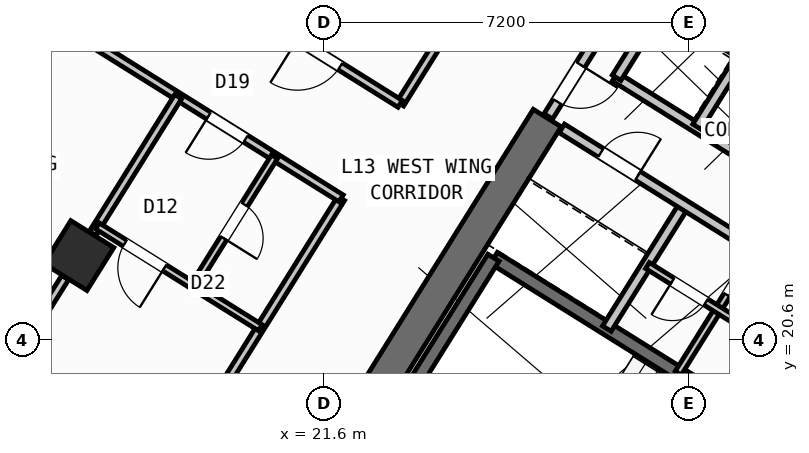
"""IFC4 building model, lengths in metres.
Left out: names, types, materials, properties, quantities, classifications, styles, units other than length and angle.
Written with IfcOpenShell. Run it as: python <this file> out.ifc"""

import sys

from ifc_helpers import new_model, si_unit, direction, frame, frame_2d, origin, origin_2d, place, context, subcontext, project, spatial, rectangle, hollow_rectangle, extrude, source, transform, mapped, element, fill, save


model = new_model("IFC4")
c1 = context("Model", 3, precision=1e-05, world=origin(), true_north=direction((0.0, 1.0)))
c2 = subcontext(c1, "Body", "Model", "MODEL_VIEW")
j1 = project(units=[si_unit("LENGTHUNIT", "METRE"), si_unit("PLANEANGLEUNIT", "RADIAN")], contexts=[c1])
p1 = place(None, origin())
s1 = spatial("IfcSite", under=j1, at=p1, CompositionType="ELEMENT")
p2 = place(p1, origin())
s2 = spatial("IfcBuilding", under=s1, at=p2, CompositionType="ELEMENT")
p3 = place(p2, frame((0.0, 0.0, 52.8)))
s3 = spatial("IfcBuildingStorey", under=s2, at=p3, CompositionType="ELEMENT", Elevation=52.8)
p4 = place(p3, frame((40.615, 23.983, 0.0), z_axis=(0.0, 0.0, 1.0), x_axis=(-0.848045953968, 0.529922692436, 0.0)))
e1 = element("IfcWall", 1, at=p4, inside=s3, PredefinedType="SHEAR", context=c2, shape_type="SweptSolid", body=[
    extrude(rectangle(XDim=13.24, YDim=0.65, at=frame_2d((6.62, 0.0))), origin(), (0.0, 0.0, 1.0), 3.35),
])
p5 = place(p3, frame((26.007, 24.976, 0.0), z_axis=(0.0, 0.0, 1.0), x_axis=(-0.529916319127, -0.848049936456, 0.0)))
e2 = element("IfcWall", 2, at=p5, inside=s3, PredefinedType="SHEAR", context=c2, shape_type="SweptSolid", body=[
    extrude(rectangle(XDim=6.375, YDim=0.65, at=frame_2d((3.188, 0.0))), origin(), (0.0, 0.0, 1.0), 3.35),
])
m1 = source(origin(), c2, "Body", "SweptSolid", [
    extrude(hollow_rectangle(XDim=1.0, YDim=1.0, WallThickness=0.04, at=origin_2d()), origin(), (0.0, 0.0, 1.0), 3.6),
])
p6 = place(p3, frame((16.764, 22.261, 0.0), z_axis=(0.0, 0.0, 1.0), x_axis=(-0.848048096156, 0.529919264233, 0.0)))
e3 = element("IfcColumn", 3, at=p6, inside=s3, PredefinedType="COLUMN", context=c2, shape_type="MappedRepresentation", body=[
    mapped(m1, transform((0.0, 0.0, 0.0), scale=1.0)),
])
p7 = place(p3, frame((29.268, 6.429, 0.0), z_axis=(0.0, 0.0, 1.0), x_axis=(-0.848049971435, 0.529916263149, 0.0)))
e4 = element("IfcWall", 4, at=p7, inside=s3, PredefinedType="STANDARD", context=c2, shape_type="SweptSolid", body=[
    extrude(rectangle(XDim=31.588, YDim=0.32, at=frame_2d((15.794, 0.0))), origin(), (0.0, 0.0, 1.0), 3.35),
])
p8 = place(p7, frame((16.362, 0.0, 0.0)))
e5 = element("IfcOpeningElement", 5, at=p8, cuts=e4, PredefinedType="OPENING", context=c2, shape_type="SweptSolid", body=[
    extrude(rectangle(XDim=1.2, YDim=2.15, at=frame_2d((0.6, 1.075))), frame((0.0, 0.17, 0.0), z_axis=(0.0, -1.0, 0.0), x_axis=(1.0, 0.0, 0.0)), (0.0, 0.0, 1.0), 0.34),
])
p9 = place(p7, frame((2.989, 0.0, 0.8)))
e6 = element("IfcOpeningElement", 6, at=p9, cuts=e4, PredefinedType="OPENING", context=c2, shape_type="SweptSolid", body=[
    extrude(rectangle(XDim=2.1, YDim=1.55, at=frame_2d((1.05, 0.775))), frame((0.0, 0.17, 0.0), z_axis=(0.0, -1.0, 0.0), x_axis=(1.0, 0.0, 0.0)), (0.0, 0.0, 1.0), 0.34),
])
p10 = place(p7, frame((8.359, 0.0, 0.8)))
e7 = element("IfcOpeningElement", 7, at=p10, cuts=e4, PredefinedType="OPENING", context=c2, shape_type="SweptSolid", body=[
    extrude(rectangle(XDim=2.1, YDim=1.55, at=frame_2d((1.05, 0.775))), frame((0.0, 0.17, 0.0), z_axis=(0.0, -1.0, 0.0), x_axis=(1.0, 0.0, 0.0)), (0.0, 0.0, 1.0), 0.34),
])
p11 = place(p7, frame((13.284, 0.0, 0.95)))
e8 = element("IfcOpeningElement", 8, at=p11, cuts=e4, PredefinedType="OPENING", context=c2, shape_type="SweptSolid", body=[
    extrude(rectangle(XDim=1.2, YDim=1.4, at=frame_2d((0.6, 0.7))), frame((0.0, 0.17, 0.0), z_axis=(0.0, -1.0, 0.0), x_axis=(1.0, 0.0, 0.0)), (0.0, 0.0, 1.0), 0.34),
])
p12 = place(p7, frame((20.259, 0.0, 0.95)))
e9 = element("IfcOpeningElement", 9, at=p12, cuts=e4, PredefinedType="OPENING", context=c2, shape_type="SweptSolid", body=[
    extrude(rectangle(XDim=1.2, YDim=1.4, at=frame_2d((0.6, 0.7))), frame((0.0, 0.17, 0.0), z_axis=(0.0, -1.0, 0.0), x_axis=(1.0, 0.0, 0.0)), (0.0, 0.0, 1.0), 0.34),
])
p13 = place(p7, frame((22.929, 0.0, 0.95)))
e10 = element("IfcOpeningElement", 10, at=p13, cuts=e4, PredefinedType="OPENING", context=c2, shape_type="SweptSolid", body=[
    extrude(rectangle(XDim=1.2, YDim=1.4, at=frame_2d((0.6, 0.7))), frame((0.0, 0.17, 0.0), z_axis=(0.0, -1.0, 0.0), x_axis=(1.0, 0.0, 0.0)), (0.0, 0.0, 1.0), 0.34),
])
p14 = place(p7, frame((26.106, 0.0, 0.85)))
e11 = element("IfcOpeningElement", 11, at=p14, cuts=e4, PredefinedType="OPENING", context=c2, shape_type="SweptSolid", body=[
    extrude(rectangle(XDim=1.5, YDim=1.5, at=frame_2d((0.75, 0.75))), frame((0.0, 0.17, 0.0), z_axis=(0.0, -1.0, 0.0), x_axis=(1.0, 0.0, 0.0)), (0.0, 0.0, 1.0), 0.34),
])
p15 = place(p7, frame((29.068, 0.0, 0.85)))
e12 = element("IfcOpeningElement", 12, at=p15, cuts=e4, PredefinedType="OPENING", context=c2, shape_type="SweptSolid", body=[
    extrude(rectangle(XDim=1.8, YDim=1.5, at=frame_2d((0.9, 0.75))), frame((0.0, 0.17, 0.0), z_axis=(0.0, -1.0, 0.0), x_axis=(1.0, 0.0, 0.0)), (0.0, 0.0, 1.0), 0.34),
])
p16 = place(p3, frame((14.138, 41.825, 0.0), z_axis=(0.0, 0.0, 1.0), x_axis=(0.848046498049, -0.529921821731, 0.0)))
e13 = element("IfcWall", 13, at=p16, inside=s3, PredefinedType="STANDARD", context=c2, shape_type="SweptSolid", body=[
    extrude(rectangle(XDim=31.588, YDim=0.32, at=frame_2d((15.794, 0.0))), origin(), (0.0, 0.0, 1.0), 3.35),
])
p17 = place(p16, frame((3.159, 0.0, 0.0)))
e14 = element("IfcOpeningElement", 14, at=p17, cuts=e13, PredefinedType="OPENING", context=c2, shape_type="SweptSolid", body=[
    extrude(rectangle(XDim=1.05, YDim=2.15, at=frame_2d((0.525, 1.075))), frame((0.0, 0.17, 0.0), z_axis=(0.0, -1.0, 0.0), x_axis=(1.0, 0.0, 0.0)), (0.0, 0.0, 1.0), 0.34),
])
p18 = place(p16, frame((0.906, 0.0, 1.0)))
e15 = element("IfcOpeningElement", 15, at=p18, cuts=e13, PredefinedType="OPENING", context=c2, shape_type="SweptSolid", body=[
    extrude(rectangle(XDim=0.9, YDim=1.25, at=frame_2d((0.45, 0.625))), frame((0.0, 0.17, 0.0), z_axis=(0.0, -1.0, 0.0), x_axis=(1.0, 0.0, 0.0)), (0.0, 0.0, 1.0), 0.34),
])
p19 = place(p16, frame((9.537, 0.0, 0.85)))
e16 = element("IfcOpeningElement", 16, at=p19, cuts=e13, PredefinedType="OPENING", context=c2, shape_type="SweptSolid", body=[
    extrude(rectangle(XDim=1.8, YDim=1.5, at=frame_2d((0.9, 0.75))), frame((0.0, 0.17, 0.0), z_axis=(0.0, -1.0, 0.0), x_axis=(1.0, 0.0, 0.0)), (0.0, 0.0, 1.0), 0.34),
])
p20 = place(p16, frame((13.899, 0.0, 0.85)))
e17 = element("IfcOpeningElement", 17, at=p20, cuts=e13, PredefinedType="OPENING", context=c2, shape_type="SweptSolid", body=[
    extrude(rectangle(XDim=1.5, YDim=1.5, at=frame_2d((0.75, 0.75))), frame((0.0, 0.17, 0.0), z_axis=(0.0, -1.0, 0.0), x_axis=(1.0, 0.0, 0.0)), (0.0, 0.0, 1.0), 0.34),
])
p21 = place(p16, frame((22.019, 0.0, 0.95)))
e18 = element("IfcOpeningElement", 18, at=p21, cuts=e13, PredefinedType="OPENING", context=c2, shape_type="SweptSolid", body=[
    extrude(rectangle(XDim=1.2, YDim=1.4, at=frame_2d((0.6, 0.7))), frame((0.0, 0.17, 0.0), z_axis=(0.0, -1.0, 0.0), x_axis=(1.0, 0.0, 0.0)), (0.0, 0.0, 1.0), 0.34),
])
p22 = place(p16, frame((27.569, 0.0, 0.95)))
e19 = element("IfcOpeningElement", 19, at=p22, cuts=e13, PredefinedType="OPENING", context=c2, shape_type="SweptSolid", body=[
    extrude(rectangle(XDim=1.2, YDim=1.4, at=frame_2d((0.6, 0.7))), frame((0.0, 0.17, 0.0), z_axis=(0.0, -1.0, 0.0), x_axis=(1.0, 0.0, 0.0)), (0.0, 0.0, 1.0), 0.34),
])
p23 = place(p3, frame((31.28, 18.261, 0.0), z_axis=(0.0, 0.0, 1.0), x_axis=(-0.848051618787, 0.529913626805, 0.0)))
e20 = element("IfcWall", 20, at=p23, inside=s3, PredefinedType="SHEAR", context=c2, shape_type="SweptSolid", body=[
    extrude(rectangle(XDim=7.46, YDim=0.26, at=frame_2d((3.73, 0.0))), origin(), (0.0, 0.0, 1.0), 3.35),
])
p24 = place(p23, frame((0.36, 0.0, 0.0)))
e21 = element("IfcOpeningElement", 21, at=p24, cuts=e20, PredefinedType="OPENING", context=c2, shape_type="SweptSolid", body=[
    extrude(rectangle(XDim=0.86, YDim=2.05, at=frame_2d((0.43, 1.025))), frame((0.0, 0.14, 0.0), z_axis=(0.0, -1.0, 0.0), x_axis=(1.0, 0.0, 0.0)), (0.0, 0.0, 1.0), 0.28),
])
p25 = place(p3, frame((24.945, 22.22, 0.0), z_axis=(0.0, 0.0, 1.0), x_axis=(-0.529908658664, -0.84805472316, 0.0)))
e22 = element("IfcWall", 22, at=p25, inside=s3, PredefinedType="SHEAR", context=c2, shape_type="SweptSolid", body=[
    extrude(rectangle(XDim=3.16, YDim=0.26, at=frame_2d((1.58, 0.0))), origin(), (0.0, 0.0, 1.0), 3.35),
])
p26 = place(p3, frame((31.822, 24.998, 0.0), z_axis=(0.0, 0.0, 1.0), x_axis=(-0.848058348634, 0.529902856485, 0.0)))
e23 = element("IfcWall", 23, at=p26, inside=s3, PredefinedType="STANDARD", context=c2, shape_type="SweptSolid", body=[
    extrude(rectangle(XDim=4.568, YDim=0.2, at=frame_2d((2.284, 0.0))), origin(), (0.0, 0.0, 1.0), 3.34),
])
p27 = place(p3, frame((32.108, 22.814, 0.0), z_axis=(0.0, 0.0, 1.0), x_axis=(-0.848042229521, 0.529928652696, 0.0)))
e24 = element("IfcWall", 24, at=p27, inside=s3, PredefinedType="STANDARD", context=c2, shape_type="SweptSolid", body=[
    extrude(rectangle(XDim=5.62, YDim=0.2, at=frame_2d((2.81, 0.0))), origin(), (0.0, 0.0, 1.0), 3.34),
])
p28 = place(p3, frame((28.25, 27.17, 0.0), z_axis=(0.0, 0.0, 1.0), x_axis=(-0.529905827651, -0.848056492117, 0.0)))
e25 = element("IfcWall", 25, at=p28, inside=s3, PredefinedType="STANDARD", context=c2, shape_type="SweptSolid", body=[
    extrude(rectangle(XDim=1.65, YDim=0.2, at=frame_2d((0.825, 0.0))), origin(), (0.0, 0.0, 1.0), 3.34),
])
p29 = place(p3, frame((29.801, 26.142, 0.0), z_axis=(0.0, 0.0, 1.0), x_axis=(-0.529998940003, -0.847998304005, 0.0)))
e26 = element("IfcWall", 26, at=p29, inside=s3, PredefinedType="STANDARD", context=c2, shape_type="SweptSolid", body=[
    extrude(rectangle(XDim=1.58, YDim=0.2, at=frame_2d((0.79, 0.0))), origin(), (0.0, 0.0, 1.0), 3.34),
])
p30 = place(p3, frame((28.71, 23.263, 0.0), z_axis=(0.0, 0.0, 1.0), x_axis=(-0.529907497854, -0.848055448493, 0.0)))
e27 = element("IfcWall", 27, at=p30, inside=s3, PredefinedType="STANDARD", context=c2, shape_type="SweptSolid", body=[
    extrude(rectangle(XDim=2.88, YDim=0.2, at=frame_2d((1.44, 0.0))), origin(), (0.0, 0.0, 1.0), 3.34),
])
p31 = place(p3, frame((31.525, 21.504, 0.0), z_axis=(0.0, 0.0, 1.0), x_axis=(-0.848044998614, 0.529924221305, 0.0)))
e28 = element("IfcWall", 28, at=p31, inside=s3, PredefinedType="STANDARD", context=c2, shape_type="SweptSolid", body=[
    extrude(rectangle(XDim=6.168, YDim=0.2, at=frame_2d((3.084, 0.0))), origin(), (0.0, 0.0, 1.0), 3.34),
])
p32 = place(p31, frame((4.4, 0.0, 0.0)))
e29 = element("IfcOpeningElement", 29, at=p32, cuts=e28, PredefinedType="OPENING", context=c2, shape_type="SweptSolid", body=[
    extrude(rectangle(XDim=0.86, YDim=2.05, at=frame_2d((0.43, 1.025))), frame((0.0, 0.11, 0.0), z_axis=(0.0, -1.0, 0.0), x_axis=(1.0, 0.0, 0.0)), (0.0, 0.0, 1.0), 0.22),
])
p33 = place(p31, frame((0.35, 0.0, 0.0)))
e30 = element("IfcOpeningElement", 30, at=p33, cuts=e28, PredefinedType="OPENING", context=c2, shape_type="SweptSolid", body=[
    extrude(rectangle(XDim=0.86, YDim=2.05, at=frame_2d((0.43, 1.025))), frame((0.0, 0.11, 0.0), z_axis=(0.0, -1.0, 0.0), x_axis=(1.0, 0.0, 0.0)), (0.0, 0.0, 1.0), 0.22),
])
p34 = place(p3, frame((30.117, 22.384, 0.0), z_axis=(0.0, 0.0, 1.0), x_axis=(-0.529951914384, -0.848027693204, 0.0)))
e31 = element("IfcWall", 31, at=p34, inside=s3, PredefinedType="PLUMBINGWALL", context=c2, shape_type="SweptSolid", body=[
    extrude(rectangle(XDim=1.4, YDim=0.14, at=frame_2d((0.7, 0.0))), origin(), (0.0, 0.0, 1.0), 3.34),
])
p35 = place(p34, frame((0.28, 0.0, 0.0)))
e32 = element("IfcOpeningElement", 32, at=p35, cuts=e31, PredefinedType="OPENING", context=c2, shape_type="SweptSolid", body=[
    extrude(rectangle(XDim=0.78, YDim=2.05, at=frame_2d((0.39, 1.025))), frame((0.0, 0.08, 0.0), z_axis=(0.0, -1.0, 0.0), x_axis=(1.0, 0.0, 0.0)), (0.0, 0.0, 1.0), 0.16),
])
p36 = place(p3, frame((29.375, 21.196, 0.0), z_axis=(0.0, 0.0, 1.0), x_axis=(-0.529865479138, -0.848081702443, 0.0)))
e33 = element("IfcWall", 33, at=p36, inside=s3, PredefinedType="PLUMBINGWALL", context=c2, shape_type="SweptSolid", body=[
    extrude(rectangle(XDim=1.48, YDim=0.14, at=frame_2d((0.74, 0.0))), origin(), (0.0, 0.0, 1.0), 3.34),
])
p37 = place(p3, frame((30.766, 20.327, 0.0), z_axis=(0.0, 0.0, 1.0), x_axis=(-0.848052663127, 0.529911955482, 0.0)))
e34 = element("IfcWall", 34, at=p37, inside=s3, PredefinedType="PLUMBINGWALL", context=c2, shape_type="SweptSolid", body=[
    extrude(rectangle(XDim=3.28, YDim=0.14, at=frame_2d((1.64, 0.0))), origin(), (0.0, 0.0, 1.0), 3.34),
])
p38 = place(p37, frame((0.25, 0.0, 0.0)))
e35 = element("IfcOpeningElement", 35, at=p38, cuts=e34, PredefinedType="OPENING", context=c2, shape_type="SweptSolid", body=[
    extrude(rectangle(XDim=0.78, YDim=2.05, at=frame_2d((0.39, 1.025))), frame((0.0, 0.08, 0.0), z_axis=(0.0, -1.0, 0.0), x_axis=(1.0, 0.0, 0.0)), (0.0, 0.0, 1.0), 0.16),
])
p39 = place(p37, frame((1.92, 0.0, 0.0)))
e36 = element("IfcOpeningElement", 36, at=p39, cuts=e34, PredefinedType="OPENING", context=c2, shape_type="SweptSolid", body=[
    extrude(rectangle(XDim=0.78, YDim=2.05, at=frame_2d((0.39, 1.025))), frame((0.0, 0.08, 0.0), z_axis=(0.0, -1.0, 0.0), x_axis=(1.0, 0.0, 0.0)), (0.0, 0.0, 1.0), 0.16),
])
p40 = place(p3, frame((27.596, 27.52, 0.0), z_axis=(0.0, 0.0, 1.0), x_axis=(-0.529865479138, -0.848081702443, 0.0)))
e37 = element("IfcWall", 37, at=p40, inside=s3, PredefinedType="STANDARD", context=c2, shape_type="SweptSolid", body=[
    extrude(rectangle(XDim=2.96, YDim=0.2, at=frame_2d((1.48, 0.0))), origin(), (0.0, 0.0, 1.0), 3.34),
])
p41 = place(p40, frame((1.76, 0.0, 0.0)))
e38 = element("IfcOpeningElement", 38, at=p41, cuts=e37, PredefinedType="OPENING", context=c2, shape_type="SweptSolid", body=[
    extrude(rectangle(XDim=0.86, YDim=2.05, at=frame_2d((0.43, 1.025))), frame((0.0, 0.11, 0.0), z_axis=(0.0, -1.0, 0.0), x_axis=(1.0, 0.0, 0.0)), (0.0, 0.0, 1.0), 0.22),
])
p42 = place(p3, frame((27.953, 33.016, 0.0), z_axis=(0.0, 0.0, 1.0), x_axis=(-0.529903001606, -0.848058257957, 0.0)))
e39 = element("IfcWall", 39, at=p42, inside=s3, PredefinedType="PARTITIONING", context=c2, shape_type="SweptSolid", body=[
    extrude(rectangle(XDim=9.15, YDim=0.16, at=frame_2d((4.575, 0.0))), origin(), (0.0, 0.0, 1.0), 3.34),
])
p43 = place(p3, frame((21.938, 23.391, 0.0), z_axis=(0.0, 0.0, 1.0), x_axis=(-0.529924725692, -0.848044683434, 0.0)))
e40 = element("IfcWall", 40, at=p43, inside=s3, PredefinedType="PARTITIONING", context=c2, shape_type="SweptSolid", body=[
    extrude(rectangle(XDim=10.35, YDim=0.16, at=frame_2d((5.175, 0.0))), origin(), (0.0, 0.0, 1.0), 3.34),
])
p44 = place(p3, frame((23.104, 25.256, 0.0), z_axis=(0.0, 0.0, 1.0), x_axis=(-0.848041752158, 0.529929416617, 0.0)))
e41 = element("IfcWall", 41, at=p44, inside=s3, PredefinedType="PARTITIONING", context=c2, shape_type="SweptSolid", body=[
    extrude(rectangle(XDim=16.73, YDim=0.16, at=frame_2d((8.365, 0.0))), origin(), (0.0, 0.0, 1.0), 3.34),
])
p45 = place(p44, frame((1.395, 0.0, 0.0)))
e42 = element("IfcOpeningElement", 42, at=p45, cuts=e41, PredefinedType="OPENING", context=c2, shape_type="SweptSolid", body=[
    extrude(rectangle(XDim=1.0, YDim=2.1, at=frame_2d((0.5, 1.05))), frame((0.0, 0.09, 0.0), z_axis=(0.0, -1.0, 0.0), x_axis=(1.0, 0.0, 0.0)), (0.0, 0.0, 1.0), 0.18),
])
p46 = place(p44, frame((7.82, 0.0, 0.0)))
e43 = element("IfcOpeningElement", 43, at=p46, cuts=e41, PredefinedType="OPENING", context=c2, shape_type="SweptSolid", body=[
    extrude(rectangle(XDim=1.0, YDim=2.1, at=frame_2d((0.5, 1.05))), frame((0.0, 0.09, 0.0), z_axis=(0.0, -1.0, 0.0), x_axis=(1.0, 0.0, 0.0)), (0.0, 0.0, 1.0), 0.18),
])
p47 = place(p44, frame((14.76, 0.0, 0.0)))
e44 = element("IfcOpeningElement", 44, at=p47, cuts=e41, PredefinedType="OPENING", context=c2, shape_type="SweptSolid", body=[
    extrude(rectangle(XDim=1.0, YDim=2.1, at=frame_2d((0.5, 1.05))), frame((0.0, 0.09, 0.0), z_axis=(0.0, -1.0, 0.0), x_axis=(1.0, 0.0, 0.0)), (0.0, 0.0, 1.0), 0.18),
])
p48 = place(p3, frame((21.938, 23.391, 0.0), z_axis=(0.0, 0.0, 1.0), x_axis=(-0.848045850158, 0.529922858565, 0.0)))
e45 = element("IfcWall", 45, at=p48, inside=s3, PredefinedType="PARTITIONING", context=c2, shape_type="SweptSolid", body=[
    extrude(rectangle(XDim=16.73, YDim=0.16, at=frame_2d((8.365, 0.0))), origin(), (0.0, 0.0, 1.0), 3.34),
])
p49 = place(p48, frame((2.22, 0.0, 0.0)))
e46 = element("IfcOpeningElement", 46, at=p49, cuts=e45, PredefinedType="OPENING", context=c2, shape_type="SweptSolid", body=[
    extrude(rectangle(XDim=0.86, YDim=2.05, at=frame_2d((0.43, 1.025))), frame((0.0, 0.09, 0.0), z_axis=(0.0, -1.0, 0.0), x_axis=(1.0, 0.0, 0.0)), (0.0, 0.0, 1.0), 0.18),
])
p50 = place(p48, frame((6.49, 0.0, 0.0)))
e47 = element("IfcOpeningElement", 47, at=p50, cuts=e45, PredefinedType="OPENING", context=c2, shape_type="SweptSolid", body=[
    extrude(rectangle(XDim=1.0, YDim=2.1, at=frame_2d((0.5, 1.05))), frame((0.0, 0.09, 0.0), z_axis=(0.0, -1.0, 0.0), x_axis=(1.0, 0.0, 0.0)), (0.0, 0.0, 1.0), 0.18),
])
p51 = place(p48, frame((11.14, 0.0, 0.0)))
e48 = element("IfcOpeningElement", 48, at=p51, cuts=e45, PredefinedType="OPENING", context=c2, shape_type="SweptSolid", body=[
    extrude(rectangle(XDim=1.0, YDim=2.1, at=frame_2d((0.5, 1.05))), frame((0.0, 0.09, 0.0), z_axis=(0.0, -1.0, 0.0), x_axis=(1.0, 0.0, 0.0)), (0.0, 0.0, 1.0), 0.18),
])
p52 = place(p3, frame((18.724, 25.399, 0.0), z_axis=(0.0, 0.0, 1.0), x_axis=(-0.529930102756, -0.848041323399, 0.0)))
e49 = element("IfcWall", 49, at=p52, inside=s3, PredefinedType="PARTITIONING", context=c2, shape_type="SweptSolid", body=[
    extrude(rectangle(XDim=3.188, YDim=0.16, at=frame_2d((1.594, 0.0))), origin(), (0.0, 0.0, 1.0), 2.725),
])
p53 = place(p3, frame((16.492, 21.827, 0.0), z_axis=(0.0, 0.0, 1.0), x_axis=(-0.529904608059, -0.848057254175, 0.0)))
e50 = element("IfcWall", 50, at=p53, inside=s3, PredefinedType="PARTITIONING", context=c2, shape_type="SweptSolid", body=[
    extrude(rectangle(XDim=5.351, YDim=0.16, at=frame_2d((2.675, 0.0))), origin(), (0.0, 0.0, 1.0), 2.725),
])
p54 = place(p3, frame((20.343, 20.838, 0.0), z_axis=(0.0, 0.0, 1.0), x_axis=(-0.848059820872, 0.529900500304, 0.0)))
e51 = element("IfcWall", 51, at=p54, inside=s3, PredefinedType="PLUMBINGWALL", context=c2, shape_type="SweptSolid", body=[
    extrude(rectangle(XDim=3.79, YDim=0.14, at=frame_2d((1.895, 0.0))), origin(), (0.0, 0.0, 1.0), 3.34),
])
p55 = place(p54, frame((2.23, 0.0, 0.0)))
e52 = element("IfcOpeningElement", 52, at=p55, cuts=e51, PredefinedType="OPENING", context=c2, shape_type="SweptSolid", body=[
    extrude(rectangle(XDim=0.92, YDim=2.08, at=frame_2d((0.46, 1.04))), frame((0.0, 0.08, 0.0), z_axis=(0.0, -1.0, 0.0), x_axis=(1.0, 0.0, 0.0)), (0.0, 0.0, 1.0), 0.16),
])
p56 = place(p3, frame((20.624, 24.212, 0.0), z_axis=(0.0, 0.0, 1.0), x_axis=(-0.529940615993, -0.848034753722, 0.0)))
e53 = element("IfcWall", 53, at=p56, inside=s3, PredefinedType="PLUMBINGWALL", context=c2, shape_type="SweptSolid", body=[
    extrude(rectangle(XDim=3.01, YDim=0.14, at=frame_2d((1.505, 0.0))), origin(), (0.0, 0.0, 1.0), 2.995),
])
p57 = place(p56, frame((1.115, 0.0, 0.0)))
e54 = element("IfcOpeningElement", 54, at=p57, cuts=e53, PredefinedType="OPENING", context=c2, shape_type="SweptSolid", body=[
    extrude(rectangle(XDim=0.78, YDim=2.05, at=frame_2d((0.39, 1.025))), frame((0.0, 0.08, 0.0), z_axis=(0.0, -1.0, 0.0), x_axis=(1.0, 0.0, 0.0)), (0.0, 0.0, 1.0), 0.16),
])
m2 = source(origin(), c2, "Body", "SweptSolid", [
    extrude(rectangle(XDim=0.86, YDim=2.05, at=frame_2d((0.43, 1.025))), frame((0.0, 0.025, 0.0), z_axis=(0.0, -1.0, 0.0), x_axis=(1.0, 0.0, 0.0)), (0.0, 0.0, 1.0), 0.05),
])
p58 = place(p32, frame((0.86, 0.0, 0.0), z_axis=(0.0, 0.0, 1.0), x_axis=(-1.0, 0.0, 0.0)))
e55 = element("IfcDoor", 55, at=p58, inside=s3, OperationType="SINGLE_SWING_RIGHT", PredefinedType="DOOR", context=c2, shape_type="MappedRepresentation", body=[
    mapped(m2, transform((0.0, 0.0, 0.0), scale=1.0)),
])
fill(e29, e55)
m3 = source(origin(), c2, "Body", "SweptSolid", [
    extrude(rectangle(XDim=0.78, YDim=2.05, at=frame_2d((0.39, 1.025))), frame((0.0, 0.025, 0.0), z_axis=(0.0, -1.0, 0.0), x_axis=(1.0, 0.0, 0.0)), (0.0, 0.0, 1.0), 0.05),
])
p59 = place(p35, origin())
e56 = element("IfcDoor", 56, at=p59, inside=s3, OperationType="SINGLE_SWING_RIGHT", PredefinedType="DOOR", context=c2, shape_type="MappedRepresentation", body=[
    mapped(m3, transform((0.0, 0.0, 0.0), scale=1.0)),
])
fill(e32, e56)
p60 = place(p39, origin())
e57 = element("IfcDoor", 57, at=p60, inside=s3, OperationType="SINGLE_SWING_RIGHT", PredefinedType="DOOR", context=c2, shape_type="MappedRepresentation", body=[
    mapped(m3, transform((0.0, 0.0, 0.0), scale=1.0)),
])
fill(e36, e57)
p61 = place(p41, origin())
e58 = element("IfcDoor", 58, at=p61, inside=s3, OperationType="SINGLE_SWING_LEFT", PredefinedType="DOOR", context=c2, shape_type="MappedRepresentation", body=[
    mapped(m2, transform((0.0, 0.0, 0.0), scale=1.0)),
])
fill(e38, e58)
p62 = place(p49, origin())
e59 = element("IfcDoor", 59, at=p62, inside=s3, OperationType="SINGLE_SWING_RIGHT", PredefinedType="DOOR", context=c2, shape_type="MappedRepresentation", body=[
    mapped(m2, transform((0.0, 0.0, 0.0), scale=1.0)),
])
fill(e46, e59)
m4 = source(origin(), c2, "Body", "SweptSolid", [
    extrude(rectangle(XDim=0.92, YDim=2.08, at=frame_2d((0.46, 1.04))), frame((0.0, 0.025, 0.0), z_axis=(0.0, -1.0, 0.0), x_axis=(1.0, 0.0, 0.0)), (0.0, 0.0, 1.0), 0.05),
])
p63 = place(p55, origin())
e60 = element("IfcDoor", 60, at=p63, inside=s3, OperationType="SINGLE_SWING_LEFT", PredefinedType="DOOR", context=c2, shape_type="MappedRepresentation", body=[
    mapped(m4, transform((0.0, 0.0, 0.0), scale=1.0)),
])
fill(e52, e60)
p64 = place(p57, origin())
e61 = element("IfcDoor", 61, at=p64, inside=s3, OperationType="SINGLE_SWING_RIGHT", PredefinedType="DOOR", context=c2, shape_type="MappedRepresentation", body=[
    mapped(m3, transform((0.0, 0.0, 0.0), scale=1.0)),
])
fill(e54, e61)
m5 = source(origin(), c2, "Body", "SweptSolid", [
    extrude(rectangle(XDim=1.0, YDim=2.1, at=frame_2d((0.5, 1.05))), frame((0.0, 0.025, 0.0), z_axis=(0.0, -1.0, 0.0), x_axis=(1.0, 0.0, 0.0)), (0.0, 0.0, 1.0), 0.05),
])
p65 = place(p45, origin())
e62 = element("IfcDoor", 62, at=p65, inside=s3, OperationType="SINGLE_SWING_RIGHT", PredefinedType="DOOR", context=c2, shape_type="MappedRepresentation", body=[
    mapped(m5, transform((0.0, 0.0, 0.0), scale=1.0)),
])
fill(e42, e62)
save(model, sys.argv[1])
